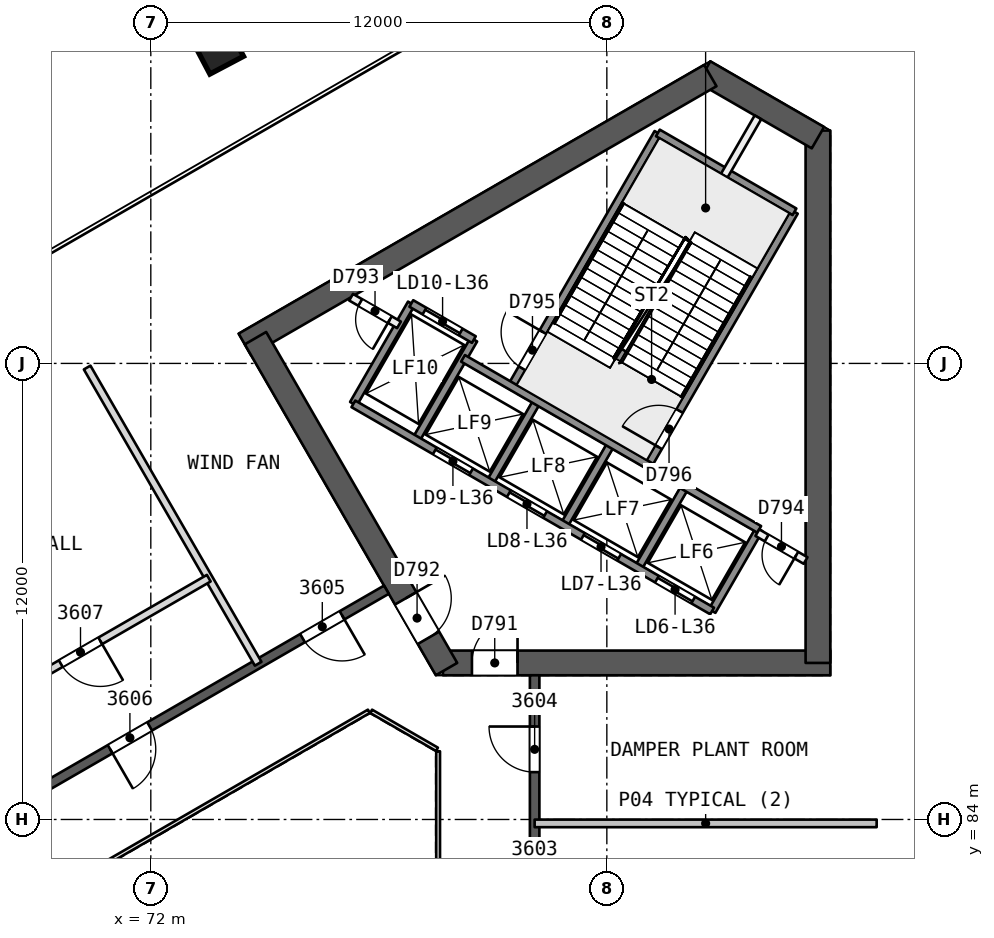
"""IFC4 building model, lengths in metres.
Left out: names, types, materials, properties, quantities, classifications, styles, units other than length and angle.
Written with IfcOpenShell. Run it as: python <this file> out.ifc"""

import sys

from ifc_helpers import new_model, si_unit, direction, frame, frame_2d, origin, origin_2d, place, context, subcontext, project, spatial, rectangle, extrude, element, fill, save


model = new_model("IFC4")
c1 = context("Model", 3, precision=1e-05, world=origin(), true_north=direction((0.0, 1.0)))
c2 = subcontext(c1, "Body", "Model", "MODEL_VIEW")
j1 = project(units=[si_unit("LENGTHUNIT", "METRE"), si_unit("PLANEANGLEUNIT", "RADIAN")], contexts=[c1])
p1 = place(None, origin())
s1 = spatial("IfcSite", under=j1, at=p1, CompositionType="ELEMENT")
p2 = place(p1, origin())
s2 = spatial("IfcBuilding", under=s1, at=p2, CompositionType="ELEMENT")
p3 = place(p2, frame((0.0, 0.0, 147.5)))
s3 = spatial("IfcBuildingStorey", under=s2, at=p3, CompositionType="ELEMENT", Elevation=147.5)
p4 = place(p3, frame((79.688, 88.119, 0.0), z_axis=(0.0, 0.0, 1.0), x_axis=(1.0, 0.0, 0.0)))
e1 = element("IfcWall", 1, at=p4, inside=s3, PredefinedType="SHEAR", context=c2, shape_type="SweptSolid", body=[
    extrude(rectangle(XDim=10.192, YDim=0.65, at=frame_2d((5.096, 0.0))), origin(), (0.0, 0.0, 1.0), 8.8),
])
p5 = place(p4, frame((0.762, 0.0, 0.0)))
e2 = element("IfcOpeningElement", 2, at=p5, cuts=e1, PredefinedType="OPENING", context=c2, shape_type="SweptSolid", body=[
    extrude(rectangle(XDim=1.2, YDim=2.1, at=frame_2d((0.6, 1.05))), frame((0.0, 0.335, 0.0), z_axis=(0.0, -1.0, 0.0), x_axis=(1.0, 0.0, 0.0)), (0.0, 0.0, 1.0), 0.671),
])
p6 = place(p3, frame((89.555, 88.119, 0.0), z_axis=(0.0, 0.0, 1.0), x_axis=(0.0, 1.0, 0.0)))
e3 = element("IfcWall", 3, at=p6, inside=s3, PredefinedType="SHEAR", context=c2, shape_type="SweptSolid", body=[
    extrude(rectangle(XDim=14.009, YDim=0.65, at=frame_2d((7.004, 0.0))), origin(), (0.0, 0.0, 1.0), 8.8),
])
p7 = place(p3, frame((89.555, 101.94, 0.0), z_axis=(0.0, 0.0, 1.0), x_axis=(-0.866031550877, 0.499989352773, 0.0)))
e4 = element("IfcWall", 4, at=p7, inside=s3, PredefinedType="SHEAR", context=c2, shape_type="SweptSolid", body=[
    extrude(rectangle(XDim=3.458, YDim=0.65, at=frame_2d((1.729, 0.0))), origin(), (0.0, 0.0, 1.0), 8.8),
])
p8 = place(p3, frame((86.723, 103.575, 0.0), z_axis=(0.0, 0.0, 1.0), x_axis=(-0.866031824457, -0.499988878904, 0.0)))
e5 = element("IfcWall", 5, at=p8, inside=s3, PredefinedType="SHEAR", context=c2, shape_type="SweptSolid", body=[
    extrude(rectangle(XDim=14.146, YDim=0.65, at=frame_2d((7.073, 0.0))), origin(), (0.0, 0.0, 1.0), 8.8),
])
p9 = place(p3, frame((74.754, 96.665, 0.0), z_axis=(0.0, 0.0, 1.0), x_axis=(0.500011799426, -0.866018591275, 0.0)))
e6 = element("IfcWall", 6, at=p9, inside=s3, PredefinedType="SHEAR", context=c2, shape_type="SweptSolid", body=[
    extrude(rectangle(XDim=10.055, YDim=0.65, at=frame_2d((5.027, 0.0))), origin(), (0.0, 0.0, 1.0), 8.8),
])
p10 = place(p9, frame((7.905, 0.0, 0.0)))
e7 = element("IfcOpeningElement", 7, at=p10, cuts=e6, PredefinedType="OPENING", context=c2, shape_type="SweptSolid", body=[
    extrude(rectangle(XDim=1.2, YDim=2.1, at=frame_2d((0.6, 1.05))), frame((0.0, 0.335, 0.0), z_axis=(0.0, -1.0, 0.0), x_axis=(1.0, 0.0, 0.0)), (0.0, 0.0, 1.0), 0.671),
])
p11 = place(p3, frame((82.1, 72.206, 0.0), z_axis=(0.0, 0.0, 1.0), x_axis=(0.0, 1.0, 0.0)))
e8 = element("IfcWall", 8, at=p11, inside=s3, PredefinedType="SHEAR", context=c2, shape_type="SweptSolid", body=[
    extrude(rectangle(XDim=15.588, YDim=0.25, at=frame_2d((7.794, 0.0))), origin(), (0.0, 0.0, 1.0), 8.35),
])
p12 = place(p11, frame((3.297, 0.0, 0.0)))
e9 = element("IfcOpeningElement", 9, at=p12, cuts=e8, PredefinedType="OPENING", context=c2, shape_type="SweptSolid", body=[
    extrude(rectangle(XDim=1.2, YDim=2.4, at=frame_2d((0.6, 1.2))), frame((0.0, 0.135, 0.0), z_axis=(0.0, -1.0, 0.0), x_axis=(1.0, 0.0, 0.0)), (0.0, 0.0, 1.0), 0.271),
])
p13 = place(p11, frame((9.143, 0.0, 0.0)))
e10 = element("IfcOpeningElement", 10, at=p13, cuts=e8, PredefinedType="OPENING", context=c2, shape_type="SweptSolid", body=[
    extrude(rectangle(XDim=1.2, YDim=2.4, at=frame_2d((0.6, 1.2))), frame((0.0, 0.135, 0.0), z_axis=(0.0, -1.0, 0.0), x_axis=(1.0, 0.0, 0.0)), (0.0, 0.0, 1.0), 0.271),
])
p14 = place(p11, frame((13.04, 0.0, 0.0)))
e11 = element("IfcOpeningElement", 11, at=p14, cuts=e8, PredefinedType="OPENING", context=c2, shape_type="SweptSolid", body=[
    extrude(rectangle(XDim=1.2, YDim=2.4, at=frame_2d((0.6, 1.2))), frame((0.0, 0.135, 0.0), z_axis=(0.0, -1.0, 0.0), x_axis=(1.0, 0.0, 0.0)), (0.0, 0.0, 1.0), 0.271),
])
p15 = place(p3, frame((78.2, 90.046, 0.0), z_axis=(0.0, 0.0, 1.0), x_axis=(-0.866026492143, -0.499998114903, 0.0)))
e12 = element("IfcWall", 12, at=p15, inside=s3, PredefinedType="SHEAR", context=c2, shape_type="SweptSolid", body=[
    extrude(rectangle(XDim=15.588, YDim=0.25, at=frame_2d((7.794, 0.0))), origin(), (0.0, 0.0, 1.0), 8.35),
])
p16 = place(p15, frame((1.349, 0.0, 0.0)))
e13 = element("IfcOpeningElement", 13, at=p16, cuts=e12, PredefinedType="OPENING", context=c2, shape_type="SweptSolid", body=[
    extrude(rectangle(XDim=1.2, YDim=2.4, at=frame_2d((0.6, 1.2))), frame((0.0, 0.135, 0.0), z_axis=(0.0, -1.0, 0.0), x_axis=(1.0, 0.0, 0.0)), (0.0, 0.0, 1.0), 0.271),
])
p17 = place(p15, frame((7.194, 0.0, 0.0)))
e14 = element("IfcOpeningElement", 14, at=p17, cuts=e12, PredefinedType="OPENING", context=c2, shape_type="SweptSolid", body=[
    extrude(rectangle(XDim=1.2, YDim=2.4, at=frame_2d((0.6, 1.2))), frame((0.0, 0.135, 0.0), z_axis=(0.0, -1.0, 0.0), x_axis=(1.0, 0.0, 0.0)), (0.0, 0.0, 1.0), 0.271),
])
p18 = place(p15, frame((13.04, 0.0, 0.0)))
e15 = element("IfcOpeningElement", 15, at=p18, cuts=e12, PredefinedType="OPENING", context=c2, shape_type="SweptSolid", body=[
    extrude(rectangle(XDim=1.2, YDim=2.4, at=frame_2d((0.6, 1.2))), frame((0.0, 0.135, 0.0), z_axis=(0.0, -1.0, 0.0), x_axis=(1.0, 0.0, 0.0)), (0.0, 0.0, 1.0), 0.271),
])
p19 = place(p3, frame((73.763, 104.317, 0.0), z_axis=(0.0008598122, -0.022798891243, 0.999739701763), x_axis=(0.865987159052, 0.499952675969, 0.010656554244)))
e16 = element("IfcColumn", 16, at=p19, inside=s3, PredefinedType="COLUMN", context=c2, shape_type="SweptSolid", body=[
    extrude(rectangle(XDim=1.0, YDim=1.0, at=origin_2d()), origin(), (0.0, 0.0, 1.0), 8.802),
])
for number, where, z_axis, x_axis in (
    (17, (91.1, 83.897, 0.0), (0.0, 0.0, 1.0), (-1.0, 0.0, 0.0)),
    (18, (70.325, 95.892, 0.0), (0.0, 0.0, 1.0), (0.5, -0.866, 0.0)),
):
    element("IfcWall", number, at=place(p3, frame(where, z_axis=z_axis, x_axis=x_axis)), inside=s3, PredefinedType="PARTITIONING", context=c2, shape_type="SweptSolid", body=[
        extrude(rectangle(XDim=9.0, YDim=0.2, at=frame_2d((4.5, 0.0))), origin(), (0.0, 0.0, 1.0), 8.35),
    ])
p20 = place(p3, frame((73.525, 90.349, 0.0), z_axis=(0.0, 0.0, 1.0), x_axis=(-0.866019710441, -0.50000986103, 0.0)))
e19 = element("IfcWall", 19, at=p20, inside=s3, PredefinedType="PARTITIONING", context=c2, shape_type="SweptSolid", body=[
    extrude(rectangle(XDim=7.794, YDim=0.2, at=frame_2d((3.897, 0.0))), origin(), (0.0, 0.0, 1.0), 8.35),
])
p21 = place(p20, frame((3.297, 0.0, 0.0)))
e20 = element("IfcOpeningElement", 20, at=p21, cuts=e19, PredefinedType="OPENING", context=c2, shape_type="SweptSolid", body=[
    extrude(rectangle(XDim=1.2, YDim=2.4, at=frame_2d((0.6, 1.2))), frame((0.0, 0.11, 0.0), z_axis=(0.0, -1.0, 0.0), x_axis=(1.0, 0.0, 0.0)), (0.0, 0.0, 1.0), 0.221),
])
for number, where, z_axis, x_axis in (
    (21, (86.77, 89.486, 0.0), (0.0, 0.0, 1.0), (0.5, 0.866, 0.0)),
    (22, (84.821, 90.611, 0.0), (0.0, 0.0, 1.0), (0.5, 0.866, 0.0)),
):
    element("IfcWall", number, at=place(p3, frame(where, z_axis=z_axis, x_axis=x_axis)), inside=s3, PredefinedType="SOLIDWALL", context=c2, shape_type="SweptSolid", body=[
        extrude(rectangle(XDim=2.48, YDim=0.2, at=frame_2d((1.24, 0.0))), origin(), (0.0, 0.0, 1.0), 8.35),
    ])
p22 = place(p3, frame((85.087, 93.321, 0.0), z_axis=(0.0, 0.0, 1.0), x_axis=(0.500019787375, 0.866013979237, 0.0)))
e23 = element("IfcWall", 23, at=p22, inside=s3, PredefinedType="SOLIDWALL", context=c2, shape_type="SweptSolid", body=[
    extrude(rectangle(XDim=7.7, YDim=0.2, at=frame_2d((3.85, 0.0))), origin(), (0.0, 0.0, 1.0), 8.35),
])
p23 = place(p22, frame((0.55, 0.0, 0.0)))
e24 = element("IfcOpeningElement", 24, at=p23, cuts=e23, PredefinedType="OPENING", context=c2, shape_type="SweptSolid", body=[
    extrude(rectangle(XDim=1.1, YDim=2.1, at=frame_2d((0.55, 1.05))), frame((0.0, 0.11, 0.0), z_axis=(0.0, -1.0, 0.0), x_axis=(1.0, 0.0, 0.0)), (0.0, 0.0, 1.0), 0.221),
])
p24 = place(p3, frame((82.873, 91.736, 0.0), z_axis=(0.0, 0.0, 1.0), x_axis=(0.499961042966, 0.86604789447, 0.0)))
e25 = element("IfcWall", 25, at=p24, inside=s3, PredefinedType="SOLIDWALL", context=c2, shape_type="SweptSolid", body=[
    extrude(rectangle(XDim=2.48, YDim=0.2, at=frame_2d((1.24, 0.0))), origin(), (0.0, 0.0, 1.0), 8.35),
])
p25 = place(p3, frame((83.34, 94.445, 0.0), z_axis=(0.0, 0.0, 1.0), x_axis=(0.499946605688, 0.86605622881, 0.0)))
e26 = element("IfcWall", 26, at=p25, inside=s3, PredefinedType="SOLIDWALL", context=c2, shape_type="SweptSolid", body=[
    extrude(rectangle(XDim=2.2, YDim=0.2, at=frame_2d((1.1, 0.0))), origin(), (0.0, 0.0, 1.0), 8.35),
])
p26 = place(p3, frame((87.09, 100.94, 0.0), z_axis=(0.0, 0.0, 1.0), x_axis=(0.499944938281, 0.866057191349, 0.0)))
e27 = element("IfcWall", 27, at=p26, inside=s3, PredefinedType="PARTITIONING", context=c2, shape_type="SweptSolid", body=[
    extrude(rectangle(XDim=1.773, YDim=0.2, at=frame_2d((0.887, 0.0))), origin(), (0.0, 0.0, 1.0), 8.35),
])
p27 = place(p3, frame((80.924, 92.861, 0.0), z_axis=(0.0, 0.0, 1.0), x_axis=(0.499961042966, 0.86604789447, 0.0)))
e28 = element("IfcWall", 28, at=p27, inside=s3, PredefinedType="SOLIDWALL", context=c2, shape_type="SweptSolid", body=[
    extrude(rectangle(XDim=2.48, YDim=0.2, at=frame_2d((1.24, 0.0))), origin(), (0.0, 0.0, 1.0), 8.35),
])
p28 = place(p3, frame((81.493, 95.396, 0.0), z_axis=(0.0, 0.0, 1.0), x_axis=(0.500006057782, 0.866021906294, 0.0)))
e29 = element("IfcWall", 29, at=p28, inside=s3, PredefinedType="SOLIDWALL", context=c2, shape_type="SweptSolid", body=[
    extrude(rectangle(XDim=7.7, YDim=0.2, at=frame_2d((3.85, 0.0))), origin(), (0.0, 0.0, 1.0), 8.35),
])
p29 = place(p28, frame((0.55, 0.0, 0.0)))
e30 = element("IfcOpeningElement", 30, at=p29, cuts=e29, PredefinedType="OPENING", context=c2, shape_type="SweptSolid", body=[
    extrude(rectangle(XDim=1.1, YDim=2.1, at=frame_2d((0.55, 1.05))), frame((0.0, 0.11, 0.0), z_axis=(0.0, -1.0, 0.0), x_axis=(1.0, 0.0, 0.0)), (0.0, 0.0, 1.0), 0.221),
])
for number, where, z_axis, x_axis in (
    (31, (78.976, 93.986, 0.0), (0.0, 0.0, 1.0), (0.5, 0.866, 0.0)),
    (32, (77.33, 94.936, 0.0), (0.0, 0.0, 1.0), (0.5, 0.866, 0.0)),
):
    element("IfcWall", number, at=place(p3, frame(where, z_axis=z_axis, x_axis=x_axis)), inside=s3, PredefinedType="SOLIDWALL", context=c2, shape_type="SweptSolid", body=[
        extrude(rectangle(XDim=3.05, YDim=0.2, at=frame_2d((1.525, 0.0))), origin(), (0.0, 0.0, 1.0), 8.35),
    ])
p30 = place(p3, frame((86.77, 89.486, 0.0), z_axis=(0.0, 0.0, 1.0), x_axis=(-0.86601811187, 0.500012629753, 0.0)))
e33 = element("IfcWall", 33, at=p30, inside=s3, PredefinedType="SOLIDWALL", context=c2, shape_type="SweptSolid", body=[
    extrude(rectangle(XDim=10.9, YDim=0.2, at=frame_2d((5.45, 0.0))), origin(), (0.0, 0.0, 1.0), 8.35),
])
p31 = place(p30, frame((0.575, 0.0, 0.0)))
e34 = element("IfcOpeningElement", 34, at=p31, cuts=e33, PredefinedType="OPENING", context=c2, shape_type="SweptSolid", body=[
    extrude(rectangle(XDim=1.1, YDim=2.1, at=frame_2d((0.55, 1.05))), frame((0.0, 0.11, 0.0), z_axis=(0.0, -1.0, 0.0), x_axis=(1.0, 0.0, 0.0)), (0.0, 0.0, 1.0), 0.221),
])
p32 = place(p30, frame((2.825, 0.0, 0.0)))
e35 = element("IfcOpeningElement", 35, at=p32, cuts=e33, PredefinedType="OPENING", context=c2, shape_type="SweptSolid", body=[
    extrude(rectangle(XDim=1.1, YDim=2.1, at=frame_2d((0.55, 1.05))), frame((0.0, 0.11, 0.0), z_axis=(0.0, -1.0, 0.0), x_axis=(1.0, 0.0, 0.0)), (0.0, 0.0, 1.0), 0.221),
])
p33 = place(p30, frame((5.075, 0.0, 0.0)))
e36 = element("IfcOpeningElement", 36, at=p33, cuts=e33, PredefinedType="OPENING", context=c2, shape_type="SweptSolid", body=[
    extrude(rectangle(XDim=1.1, YDim=2.1, at=frame_2d((0.55, 1.05))), frame((0.0, 0.11, 0.0), z_axis=(0.0, -1.0, 0.0), x_axis=(1.0, 0.0, 0.0)), (0.0, 0.0, 1.0), 0.221),
])
p34 = place(p30, frame((7.325, 0.0, 0.0)))
e37 = element("IfcOpeningElement", 37, at=p34, cuts=e33, PredefinedType="OPENING", context=c2, shape_type="SweptSolid", body=[
    extrude(rectangle(XDim=1.1, YDim=2.1, at=frame_2d((0.55, 1.05))), frame((0.0, 0.11, 0.0), z_axis=(0.0, -1.0, 0.0), x_axis=(1.0, 0.0, 0.0)), (0.0, 0.0, 1.0), 0.221),
])
p35 = place(p3, frame((89.23, 90.814, 0.0), z_axis=(0.0, 0.0, 1.0), x_axis=(-0.866022048785, 0.500005810984, 0.0)))
e38 = element("IfcWall", 38, at=p35, inside=s3, PredefinedType="PARTITIONING", context=c2, shape_type="SweptSolid", body=[
    extrude(rectangle(XDim=1.467, YDim=0.2, at=frame_2d((0.733, 0.0))), origin(), (0.0, 0.0, 1.0), 8.35),
])
p36 = place(p35, frame((0.283, 0.0, 0.0)))
e39 = element("IfcOpeningElement", 39, at=p36, cuts=e38, PredefinedType="OPENING", context=c2, shape_type="SweptSolid", body=[
    extrude(rectangle(XDim=0.9, YDim=2.1, at=frame_2d((0.45, 1.05))), frame((0.0, 0.11, 0.0), z_axis=(0.0, -1.0, 0.0), x_axis=(1.0, 0.0, 0.0)), (0.0, 0.0, 1.0), 0.221),
])
p37 = place(p3, frame((78.53, 97.014, 0.0), z_axis=(0.0, 0.0, 1.0), x_axis=(-0.866045896294, 0.499964504253, 0.0)))
e40 = element("IfcWall", 40, at=p37, inside=s3, PredefinedType="PARTITIONING", context=c2, shape_type="SweptSolid", body=[
    extrude(rectangle(XDim=1.455, YDim=0.2, at=frame_2d((0.728, 0.0))), origin(), (0.0, 0.0, 1.0), 8.35),
])
p38 = place(p37, frame((0.278, 0.0, 0.0)))
e41 = element("IfcOpeningElement", 41, at=p38, cuts=e40, PredefinedType="OPENING", context=c2, shape_type="SweptSolid", body=[
    extrude(rectangle(XDim=0.9, YDim=2.1, at=frame_2d((0.45, 1.05))), frame((0.0, 0.11, 0.0), z_axis=(0.0, -1.0, 0.0), x_axis=(1.0, 0.0, 0.0)), (0.0, 0.0, 1.0), 0.221),
])
p39 = place(p3, frame((88.01, 91.634, 0.0), z_axis=(0.0, 0.0, 1.0), x_axis=(-0.866024315419, 0.5000018851, 0.0)))
e42 = element("IfcWall", 42, at=p39, inside=s3, PredefinedType="SOLIDWALL", context=c2, shape_type="SweptSolid", body=[
    extrude(rectangle(XDim=9.0, YDim=0.2, at=frame_2d((4.5, 0.0))), origin(), (0.0, 0.0, 1.0), 8.35),
])
p40 = place(p3, frame((80.5, 96.627, 0.0), z_axis=(0.0, 0.0, 1.0), x_axis=(-0.86601224135, 0.500022797313, 0.0)))
e43 = element("IfcWall", 43, at=p40, inside=s3, PredefinedType="SOLIDWALL", context=c2, shape_type="SweptSolid", body=[
    extrude(rectangle(XDim=1.9, YDim=0.2, at=frame_2d((0.95, 0.0))), origin(), (0.0, 0.0, 1.0), 8.35),
])
p41 = place(p40, frame((0.4, 0.0, 0.0)))
e44 = element("IfcOpeningElement", 44, at=p41, cuts=e43, PredefinedType="OPENING", context=c2, shape_type="SweptSolid", body=[
    extrude(rectangle(XDim=1.1, YDim=2.1, at=frame_2d((0.55, 1.05))), frame((0.0, 0.11, 0.0), z_axis=(0.0, -1.0, 0.0), x_axis=(1.0, 0.0, 0.0)), (0.0, 0.0, 1.0), 0.221),
])
p42 = place(p3, frame((88.937, 99.99, 0.0), z_axis=(0.0, 0.0, 1.0), x_axis=(-0.866004344652, 0.500036473714, 0.0)))
e45 = element("IfcWall", 45, at=p42, inside=s3, PredefinedType="SOLIDWALL", context=c2, shape_type="SweptSolid", body=[
    extrude(rectangle(XDim=4.15, YDim=0.2, at=frame_2d((2.075, 0.0))), origin(), (0.0, 0.0, 1.0), 8.35),
])
p43 = place(p3, frame((79.56, 74.206, 0.0), z_axis=(0.0, 0.0, 1.0), x_axis=(0.0, 1.0, 0.0)))
e46 = element("IfcWall", 46, at=p43, inside=s3, PredefinedType="PARTITIONING", context=c2, shape_type="SweptSolid", body=[
    extrude(rectangle(XDim=11.588, YDim=0.1, at=frame_2d((5.794, 0.0))), origin(), (0.0, 0.0, 1.0), 8.35),
])
p44 = place(p3, frame((79.53, 85.846, 0.0), z_axis=(0.0, 0.0, 1.0), x_axis=(-0.866041268327, 0.499972520799, 0.0)))
e47 = element("IfcWall", 47, at=p44, inside=s3, PredefinedType="PARTITIONING", context=c2, shape_type="SweptSolid", body=[
    extrude(rectangle(XDim=2.0, YDim=0.1, at=frame_2d((1.0, 0.0))), origin(), (0.0, 0.0, 1.0), 8.35),
])
p45 = place(p3, frame((77.738, 86.846, 0.0), z_axis=(0.0, 0.0, 1.0), x_axis=(-0.866026658274, -0.499997827154, 0.0)))
e48 = element("IfcWall", 48, at=p45, inside=s3, PredefinedType="PARTITIONING", context=c2, shape_type="SweptSolid", body=[
    extrude(rectangle(XDim=11.588, YDim=0.1, at=frame_2d((5.794, 0.0))), origin(), (0.0, 0.0, 1.0), 8.35),
])
p46 = place(p14, origin())
e49 = element("IfcDoor", 49, at=p46, inside=s3, OperationType="SINGLE_SWING_RIGHT", PredefinedType="NOTDEFINED", context=c2, shape_type="SweptSolid", body=[
    extrude(rectangle(XDim=1.2, YDim=2.4, at=frame_2d((0.6, 1.2))), frame((0.0, 0.025, 0.0), z_axis=(0.0, -1.0, 0.0), x_axis=(1.0, 0.0, 0.0)), (0.0, 0.0, 1.0), 0.05),
])
fill(e11, e49)
p47 = place(p16, origin())
e50 = element("IfcDoor", 50, at=p47, inside=s3, OperationType="SINGLE_SWING_LEFT", PredefinedType="NOTDEFINED", context=c2, shape_type="SweptSolid", body=[
    extrude(rectangle(XDim=1.2, YDim=2.4, at=frame_2d((0.6, 1.2))), frame((0.0, 0.025, 0.0), z_axis=(0.0, -1.0, 0.0), x_axis=(1.0, 0.0, 0.0)), (0.0, 0.0, 1.0), 0.05),
])
fill(e13, e50)
p48 = place(p17, origin())
e51 = element("IfcDoor", 51, at=p48, inside=s3, OperationType="SINGLE_SWING_RIGHT", PredefinedType="NOTDEFINED", context=c2, shape_type="SweptSolid", body=[
    extrude(rectangle(XDim=1.2, YDim=2.4, at=frame_2d((0.6, 1.2))), frame((0.0, 0.025, 0.0), z_axis=(0.0, -1.0, 0.0), x_axis=(1.0, 0.0, 0.0)), (0.0, 0.0, 1.0), 0.05),
])
fill(e14, e51)
p49 = place(p21, origin())
e52 = element("IfcDoor", 52, at=p49, inside=s3, OperationType="SINGLE_SWING_LEFT", PredefinedType="NOTDEFINED", context=c2, shape_type="SweptSolid", body=[
    extrude(rectangle(XDim=1.2, YDim=2.4, at=frame_2d((0.6, 1.2))), frame((0.0, 0.025, 0.0), z_axis=(0.0, -1.0, 0.0), x_axis=(1.0, 0.0, 0.0)), (0.0, 0.0, 1.0), 0.05),
])
fill(e20, e52)
p50 = place(p5, origin())
e53 = element("IfcDoor", 53, at=p50, inside=s3, OperationType="SINGLE_SWING_RIGHT", PredefinedType="NOTDEFINED", context=c2, shape_type="SweptSolid", body=[
    extrude(rectangle(XDim=1.2, YDim=2.1, at=frame_2d((0.6, 1.05))), frame((0.0, 0.025, 0.0), z_axis=(0.0, -1.0, 0.0), x_axis=(1.0, 0.0, 0.0)), (0.0, 0.0, 1.0), 0.05),
])
fill(e2, e53)
p51 = place(p10, origin())
e54 = element("IfcDoor", 54, at=p51, inside=s3, OperationType="SINGLE_SWING_LEFT", PredefinedType="NOTDEFINED", context=c2, shape_type="SweptSolid", body=[
    extrude(rectangle(XDim=1.2, YDim=2.1, at=frame_2d((0.6, 1.05))), frame((0.0, 0.025, 0.0), z_axis=(0.0, -1.0, 0.0), x_axis=(1.0, 0.0, 0.0)), (0.0, 0.0, 1.0), 0.05),
])
fill(e7, e54)
p52 = place(p31, origin())
e55 = element("IfcDoor", 55, at=p52, inside=s3, OperationType="SLIDING_TO_RIGHT", PredefinedType="NOTDEFINED", context=c2, shape_type="SweptSolid", body=[
    extrude(rectangle(XDim=1.1, YDim=2.1, at=frame_2d((0.55, 1.05))), frame((0.0, 0.025, 0.0), z_axis=(0.0, -1.0, 0.0), x_axis=(1.0, 0.0, 0.0)), (0.0, 0.0, 1.0), 0.05),
])
fill(e34, e55)
p53 = place(p32, origin())
e56 = element("IfcDoor", 56, at=p53, inside=s3, OperationType="SLIDING_TO_LEFT", PredefinedType="NOTDEFINED", context=c2, shape_type="SweptSolid", body=[
    extrude(rectangle(XDim=1.1, YDim=2.1, at=frame_2d((0.55, 1.05))), frame((0.0, 0.025, 0.0), z_axis=(0.0, -1.0, 0.0), x_axis=(1.0, 0.0, 0.0)), (0.0, 0.0, 1.0), 0.05),
])
fill(e35, e56)
p54 = place(p33, origin())
e57 = element("IfcDoor", 57, at=p54, inside=s3, OperationType="SLIDING_TO_RIGHT", PredefinedType="NOTDEFINED", context=c2, shape_type="SweptSolid", body=[
    extrude(rectangle(XDim=1.1, YDim=2.1, at=frame_2d((0.55, 1.05))), frame((0.0, 0.025, 0.0), z_axis=(0.0, -1.0, 0.0), x_axis=(1.0, 0.0, 0.0)), (0.0, 0.0, 1.0), 0.05),
])
fill(e36, e57)
p55 = place(p34, origin())
e58 = element("IfcDoor", 58, at=p55, inside=s3, OperationType="SLIDING_TO_LEFT", PredefinedType="NOTDEFINED", context=c2, shape_type="SweptSolid", body=[
    extrude(rectangle(XDim=1.1, YDim=2.1, at=frame_2d((0.55, 1.05))), frame((0.0, 0.025, 0.0), z_axis=(0.0, -1.0, 0.0), x_axis=(1.0, 0.0, 0.0)), (0.0, 0.0, 1.0), 0.05),
])
fill(e37, e58)
p56 = place(p41, origin())
e59 = element("IfcDoor", 59, at=p56, inside=s3, OperationType="SLIDING_TO_RIGHT", PredefinedType="NOTDEFINED", context=c2, shape_type="SweptSolid", body=[
    extrude(rectangle(XDim=1.1, YDim=2.1, at=frame_2d((0.55, 1.05))), frame((0.0, 0.025, 0.0), z_axis=(0.0, -1.0, 0.0), x_axis=(1.0, 0.0, 0.0)), (0.0, 0.0, 1.0), 0.05),
])
fill(e44, e59)
p57 = place(p38, origin())
e60 = element("IfcDoor", 60, at=p57, inside=s3, OperationType="SINGLE_SWING_LEFT", PredefinedType="NOTDEFINED", context=c2, shape_type="SweptSolid", body=[
    extrude(rectangle(XDim=0.9, YDim=2.1, at=frame_2d((0.45, 1.05))), frame((0.0, 0.025, 0.0), z_axis=(0.0, -1.0, 0.0), x_axis=(1.0, 0.0, 0.0)), (0.0, 0.0, 1.0), 0.05),
])
fill(e41, e60)
p58 = place(p36, origin())
e61 = element("IfcDoor", 61, at=p58, inside=s3, OperationType="SINGLE_SWING_LEFT", PredefinedType="NOTDEFINED", context=c2, shape_type="SweptSolid", body=[
    extrude(rectangle(XDim=0.9, YDim=2.1, at=frame_2d((0.45, 1.05))), frame((0.0, 0.025, 0.0), z_axis=(0.0, -1.0, 0.0), x_axis=(1.0, 0.0, 0.0)), (0.0, 0.0, 1.0), 0.05),
])
fill(e39, e61)
p59 = place(p29, origin())
e62 = element("IfcDoor", 62, at=p59, inside=s3, OperationType="SINGLE_SWING_RIGHT", PredefinedType="NOTDEFINED", context=c2, shape_type="SweptSolid", body=[
    extrude(rectangle(XDim=1.1, YDim=2.1, at=frame_2d((0.55, 1.05))), frame((0.0, 0.025, 0.0), z_axis=(0.0, -1.0, 0.0), x_axis=(1.0, 0.0, 0.0)), (0.0, 0.0, 1.0), 0.05),
])
fill(e30, e62)
p60 = place(p23, origin())
e63 = element("IfcDoor", 63, at=p60, inside=s3, OperationType="SINGLE_SWING_LEFT", PredefinedType="NOTDEFINED", context=c2, shape_type="SweptSolid", body=[
    extrude(rectangle(XDim=1.1, YDim=2.1, at=frame_2d((0.55, 1.05))), frame((0.0, 0.025, 0.0), z_axis=(0.0, -1.0, 0.0), x_axis=(1.0, 0.0, 0.0)), (0.0, 0.0, 1.0), 0.05),
])
fill(e24, e63)
save(model, sys.argv[1])
